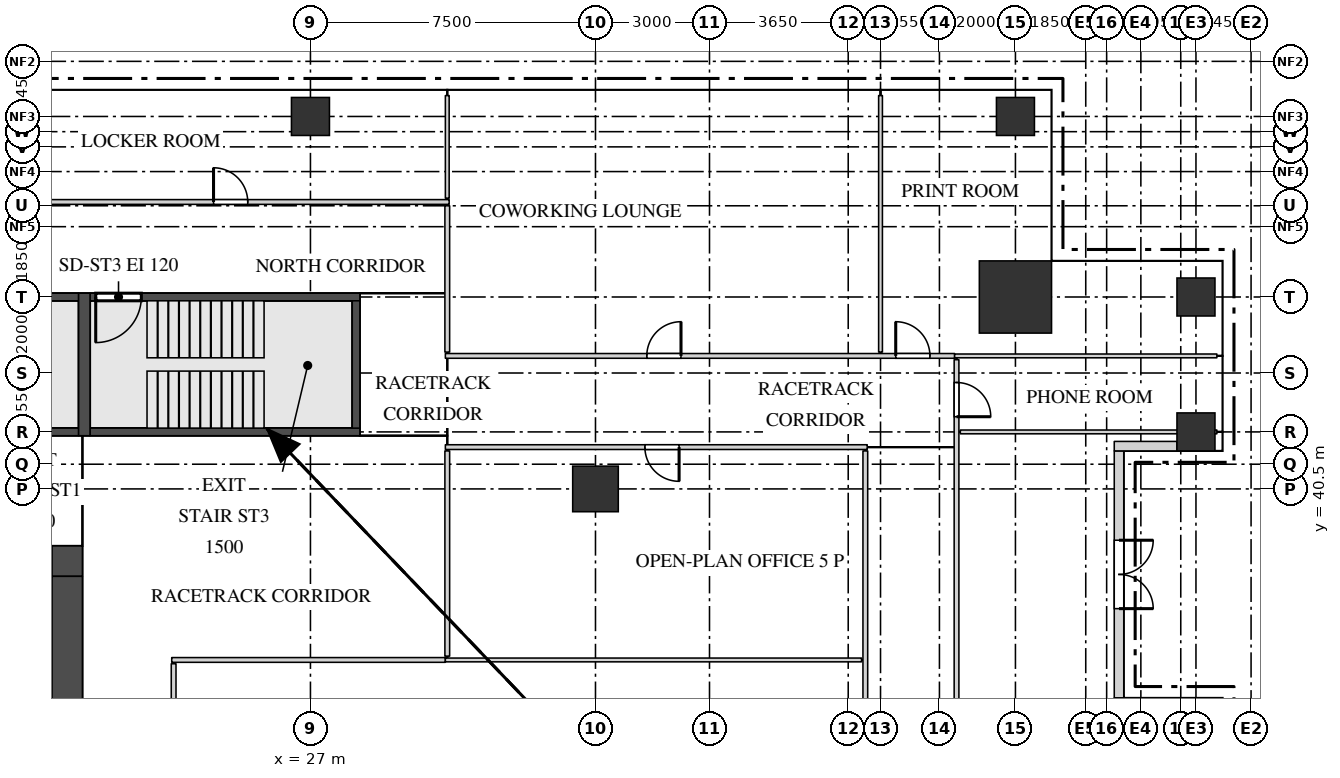
"""IFC4 building model, lengths in metres.
Left out: names, types, materials, properties, quantities, classifications, styles, units other than length and angle.
Written with IfcOpenShell. Run it as: python <this file> out.ifc"""

import sys

from ifc_helpers import new_model, si_unit, direction, frame, frame_2d, origin, origin_2d, place, context, subcontext, project, spatial, rectangle, extrude, source, transform, mapped, element, fill, save


model = new_model("IFC4")
c1 = context("Model", 3, precision=1e-05, world=origin(), true_north=direction((0.0, 1.0)))
c2 = subcontext(c1, "Body", "Model", "MODEL_VIEW")
j1 = project(units=[si_unit("LENGTHUNIT", "METRE"), si_unit("PLANEANGLEUNIT", "RADIAN")], contexts=[c1])
p1 = place(None, origin())
s1 = spatial("IfcSite", under=j1, at=p1, CompositionType="ELEMENT")
p2 = place(p1, origin())
s2 = spatial("IfcBuilding", under=s1, at=p2, CompositionType="ELEMENT")
p3 = place(p2, frame((0.0, 0.0, 188.7)))
s3 = spatial("IfcBuildingStorey", under=s2, at=p3, CompositionType="ELEMENT", Elevation=188.7)
m1 = source(origin(), c2, "Body", "SweptSolid", [
    extrude(rectangle(XDim=0.8, YDim=0.8, at=frame_2d((0.4, 0.0))), origin(), (0.0, 0.0, 1.0), 3.75),
])
p4 = place(p3, frame((20.2, 38.6, 0.0), z_axis=(0.0, 0.0, 1.0), x_axis=(1.0, 0.0, 0.0)))
e1 = element("IfcWall", 1, at=p4, inside=s3, PredefinedType="SHEAR", context=c2, shape_type="MappedRepresentation", body=[
    mapped(m1, transform((0.0, 0.0, 0.0))),
])
m2 = source(origin(), c2, "Body", "SweptSolid", [
    extrude(rectangle(XDim=22.4, YDim=0.8, at=frame_2d((11.2, 0.0))), origin(), (0.0, 0.0, 1.0), 3.75),
])
p5 = place(p3, frame((20.6, 15.8, 0.0), z_axis=(0.0, 0.0, 1.0), x_axis=(0.0, 1.0, 0.0)))
e2 = element("IfcWall", 2, at=p5, inside=s3, PredefinedType="SHEAR", context=c2, shape_type="MappedRepresentation", body=[
    mapped(m2, transform((0.0, 0.0, 0.0))),
])
m3 = source(origin(), c2, "Body", "SweptSolid", [
    extrude(rectangle(XDim=1.8, YDim=2.1, at=frame_2d((0.9, 1.05))), frame((0.0, 0.41, 0.0), z_axis=(0.0, -1.0, 0.0), x_axis=(1.0, 0.0, 0.0)), (0.0, 0.0, 1.0), 0.82),
])
p6 = place(p5, frame((10.7, 0.0, 0.0)))
e3 = element("IfcOpeningElement", 3, at=p6, cuts=e2, PredefinedType="OPENING", context=c2, shape_type="MappedRepresentation", body=[
    mapped(m3, transform((0.0, 0.0, 0.0))),
])
m4 = source(origin(), c2, "Body", "SweptSolid", [
    extrude(rectangle(XDim=0.9, YDim=2.1, at=frame_2d((0.45, 1.05))), frame((0.0, 0.41, 0.0), z_axis=(0.0, -1.0, 0.0), x_axis=(1.0, 0.0, 0.0)), (0.0, 0.0, 1.0), 0.82),
])
p7 = place(p5, frame((0.35, 0.0, 0.0)))
e4 = element("IfcOpeningElement", 4, at=p7, cuts=e2, PredefinedType="OPENING", context=c2, shape_type="MappedRepresentation", body=[
    mapped(m4, transform((0.0, 0.0, 0.0))),
])
p8 = place(p5, frame((2.15, 0.0, 0.0)))
e5 = element("IfcOpeningElement", 5, at=p8, cuts=e2, PredefinedType="OPENING", context=c2, shape_type="MappedRepresentation", body=[
    mapped(m4, transform((0.0, 0.0, 0.0))),
])
m5 = source(origin(), c2, "Body", "SweptSolid", [
    extrude(rectangle(XDim=1.0, YDim=2.1, at=frame_2d((0.5, 1.05))), frame((0.0, 0.41, 0.0), z_axis=(0.0, -1.0, 0.0), x_axis=(1.0, 0.0, 0.0)), (0.0, 0.0, 1.0), 0.82),
])
p9 = place(p5, frame((4.85, 0.0, 0.0)))
e6 = element("IfcOpeningElement", 6, at=p9, cuts=e2, PredefinedType="OPENING", context=c2, shape_type="MappedRepresentation", body=[
    mapped(m5, transform((0.0, 0.0, 0.0))),
])
m6 = source(origin(), c2, "Body", "SweptSolid", [
    extrude(rectangle(XDim=7.0, YDim=0.2, at=frame_2d((3.5, 0.0))), origin(), (0.0, 0.0, 1.0), 3.75),
])
p10 = place(p3, frame((13.9, 45.55, 0.0), z_axis=(0.0, 0.0, 1.0), x_axis=(1.0, 0.0, 0.0)))
e7 = element("IfcWall", 7, at=p10, inside=s3, PredefinedType="SHEAR", context=c2, shape_type="MappedRepresentation", body=[
    mapped(m6, transform((0.0, 0.0, 0.0))),
])
m7 = source(origin(), c2, "Body", "SweptSolid", [
    extrude(rectangle(XDim=1.2, YDim=2.1, at=frame_2d((0.6, 1.05))), frame((0.0, 0.11, 0.0), z_axis=(0.0, -1.0, 0.0), x_axis=(1.0, 0.0, 0.0)), (0.0, 0.0, 1.0), 0.22),
])
p11 = place(p10, frame((0.35, 0.0, 0.0)))
e8 = element("IfcOpeningElement", 8, at=p11, cuts=e7, PredefinedType="OPENING", context=c2, shape_type="MappedRepresentation", body=[
    mapped(m7, transform((0.0, 0.0, 0.0))),
])
p12 = place(p3, frame((13.9, 42.0, 0.0), z_axis=(0.0, 0.0, 1.0), x_axis=(1.0, 0.0, 0.0)))
e9 = element("IfcWall", 9, at=p12, inside=s3, PredefinedType="SHEAR", context=c2, shape_type="MappedRepresentation", body=[
    mapped(m6, transform((0.0, 0.0, 0.0))),
])
m8 = source(origin(), c2, "Body", "SweptSolid", [
    extrude(rectangle(XDim=7.1, YDim=0.2, at=frame_2d((3.55, 0.0))), origin(), (0.0, 0.0, 1.0), 3.75),
])
p13 = place(p3, frame((21.2, 45.55, 0.0), z_axis=(0.0, 0.0, 1.0), x_axis=(1.0, 0.0, 0.0)))
e10 = element("IfcWall", 10, at=p13, inside=s3, PredefinedType="SHEAR", context=c2, shape_type="MappedRepresentation", body=[
    mapped(m8, transform((0.0, 0.0, 0.0))),
])
p14 = place(p13, frame((0.15, 0.0, 0.0)))
e11 = element("IfcOpeningElement", 11, at=p14, cuts=e10, PredefinedType="OPENING", context=c2, shape_type="MappedRepresentation", body=[
    mapped(m7, transform((0.0, 0.0, 0.0))),
])
p15 = place(p3, frame((21.2, 42.0, 0.0), z_axis=(0.0, 0.0, 1.0), x_axis=(1.0, 0.0, 0.0)))
e12 = element("IfcWall", 12, at=p15, inside=s3, PredefinedType="SHEAR", context=c2, shape_type="MappedRepresentation", body=[
    mapped(m8, transform((0.0, 0.0, 0.0))),
])
m9 = source(origin(), c2, "Body", "SweptSolid", [
    extrude(rectangle(XDim=3.75, YDim=0.3, at=frame_2d((1.875, 0.0))), origin(), (0.0, 0.0, 1.0), 3.75),
])
p16 = place(p3, frame((21.05, 41.9, 0.0), z_axis=(0.0, 0.0, 1.0), x_axis=(0.0, 1.0, 0.0)))
e13 = element("IfcWall", 13, at=p16, inside=s3, PredefinedType="SHEAR", context=c2, shape_type="MappedRepresentation", body=[
    mapped(m9, transform((0.0, 0.0, 0.0))),
])
m10 = source(origin(), c2, "Body", "SweptSolid", [
    extrude(rectangle(XDim=3.35, YDim=0.2, at=frame_2d((1.675, 0.0))), origin(), (0.0, 0.0, 1.0), 3.75),
])
p17 = place(p3, frame((28.2, 42.1, 0.0), z_axis=(0.0, 0.0, 1.0), x_axis=(0.0, 1.0, 0.0)))
e14 = element("IfcWall", 14, at=p17, inside=s3, PredefinedType="SHEAR", context=c2, shape_type="MappedRepresentation", body=[
    mapped(m10, transform((0.0, 0.0, 0.0))),
])
m11 = source(origin(), c2, "Body", "SweptSolid", [
    extrude(rectangle(XDim=1.9, YDim=1.9, at=origin_2d()), origin(), (0.0, 0.0, 1.0), 4.0),
])
p18 = place(p3, frame((45.55, 45.55, 0.0), z_axis=(0.0, 0.0, 1.0), x_axis=(1.0, 0.0, 0.0)))
e15 = element("IfcColumn", 15, at=p18, inside=s3, PredefinedType="COLUMN", context=c2, shape_type="MappedRepresentation", body=[
    mapped(m11, transform((0.0, 0.0, 0.0))),
])
m12 = source(origin(), c2, "Body", "SweptSolid", [
    extrude(rectangle(XDim=1.0, YDim=1.0, at=origin_2d()), origin(), (0.0, 0.0, 1.0), 3.75),
])
for number, where, z_axis, x_axis in (
    (16, (50.3, 42.0, 0.0), (0.0, 0.0, 1.0), (1.0, 0.0, 0.0)),
    (17, (50.3, 45.55, 0.0), (0.0, 0.0, 1.0), (1.0, 0.0, 0.0)),
    (18, (27.0, 50.3, 0.0), (0.0, 0.0, 1.0), (1.0, 0.0, 0.0)),
    (19, (45.55, 50.3, 0.0), (0.0, 0.0, 1.0), (1.0, 0.0, 0.0)),
):
    element("IfcColumn", number, at=place(p3, frame(where, z_axis=z_axis, x_axis=x_axis)), inside=s3, PredefinedType="COLUMN", context=c2, shape_type="MappedRepresentation", body=[
        mapped(m12, transform((0.0, 0.0, 0.0))),
    ])
m13 = source(origin(), c2, "Body", "SweptSolid", [
    extrude(rectangle(XDim=1.2, YDim=1.2, at=origin_2d()), origin(), (0.0, 0.0, 1.0), 3.75),
])
p19 = place(p3, frame((34.5, 40.5, 0.0), z_axis=(0.0, 0.0, 1.0), x_axis=(1.0, 0.0, 0.0)))
e20 = element("IfcColumn", 20, at=p19, inside=s3, PredefinedType="COLUMN", context=c2, shape_type="MappedRepresentation", body=[
    mapped(m13, transform((0.0, 0.0, 0.0))),
])
m14 = source(origin(), c2, "Body", "SweptSolid", [
    extrude(rectangle(XDim=6.5, YDim=0.25, at=frame_2d((3.25, 0.0))), origin(), (0.0, 0.0, 1.0), 3.15),
])
p20 = place(p3, frame((48.275, 35.0, 0.0), z_axis=(0.0, 0.0, 1.0), x_axis=(0.0, 1.0, 0.0)))
e21 = element("IfcWall", 21, at=p20, inside=s3, PredefinedType="SOLIDWALL", context=c2, shape_type="MappedRepresentation", body=[
    mapped(m14, transform((0.0, 0.0, 0.0))),
])
m15 = source(origin(), c2, "Body", "SweptSolid", [
    extrude(rectangle(XDim=1.75, YDim=2.4, at=frame_2d((0.875, 1.2))), frame((0.0, 0.135, 0.0), z_axis=(0.0, -1.0, 0.0), x_axis=(1.0, 0.0, 0.0)), (0.0, 0.0, 1.0), 0.27),
])
p21 = place(p20, frame((0.3, 0.0, 0.0)))
e22 = element("IfcOpeningElement", 22, at=p21, cuts=e21, PredefinedType="OPENING", context=c2, shape_type="MappedRepresentation", body=[
    mapped(m15, transform((0.0, 0.0, 0.0))),
])
p22 = place(p20, frame((4.45, 0.0, 0.0)))
e23 = element("IfcOpeningElement", 23, at=p22, cuts=e21, PredefinedType="OPENING", context=c2, shape_type="MappedRepresentation", body=[
    mapped(m15, transform((0.0, 0.0, 0.0))),
])
m16 = source(origin(), c2, "Body", "SweptSolid", [
    extrude(rectangle(XDim=1.8, YDim=2.4, at=frame_2d((0.9, 1.2))), frame((0.0, 0.135, 0.0), z_axis=(0.0, -1.0, 0.0), x_axis=(1.0, 0.0, 0.0)), (0.0, 0.0, 1.0), 0.27),
])
p23 = place(p20, frame((2.35, 0.0, 0.0)))
e24 = element("IfcOpeningElement", 24, at=p23, cuts=e21, PredefinedType="OPENING", context=c2, shape_type="MappedRepresentation", body=[
    mapped(m16, transform((0.0, 0.0, 0.0))),
])
m17 = source(origin(), c2, "Body", "SweptSolid", [
    extrude(rectangle(XDim=1.65, YDim=0.25, at=frame_2d((0.825, 0.0))), origin(), (0.0, 0.0, 1.0), 3.15),
])
p24 = place(p3, frame((49.8, 41.625, 0.0), z_axis=(0.0, 0.0, 1.0), x_axis=(-1.0, 0.0, 0.0)))
e25 = element("IfcWall", 25, at=p24, inside=s3, PredefinedType="SOLIDWALL", context=c2, shape_type="MappedRepresentation", body=[
    mapped(m17, transform((0.0, 0.0, 0.0))),
])
m18 = source(origin(), c2, "Body", "SweptSolid", [
    extrude(rectangle(XDim=33.8, YDim=0.125, at=frame_2d((16.9, 0.0))), origin(), (0.0, 0.0, 1.0), 3.8),
])
p25 = place(p3, frame((44.0, 10.1, 0.0), z_axis=(0.0, 0.0, 1.0), x_axis=(0.0, 1.0, 0.0)))
e26 = element("IfcWall", 26, at=p25, inside=s3, PredefinedType="PARTITIONING", context=c2, shape_type="MappedRepresentation", body=[
    mapped(m18, transform((0.0, 0.0, 0.0))),
])
m19 = source(origin(), c2, "Body", "SweptSolid", [
    extrude(rectangle(XDim=0.9, YDim=2.1, at=frame_2d((0.45, 1.05))), frame((0.0, 0.073, 0.0), z_axis=(0.0, -1.0, 0.0), x_axis=(1.0, 0.0, 0.0)), (0.0, 0.0, 1.0), 0.145),
])
p26 = place(p25, frame((5.25, 0.0, 0.0)))
e27 = element("IfcOpeningElement", 27, at=p26, cuts=e26, PredefinedType="OPENING", context=c2, shape_type="MappedRepresentation", body=[
    mapped(m19, transform((0.0, 0.0, 0.0))),
])
p27 = place(p25, frame((12.55, 0.0, 0.0)))
e28 = element("IfcOpeningElement", 28, at=p27, cuts=e26, PredefinedType="OPENING", context=c2, shape_type="MappedRepresentation", body=[
    mapped(m19, transform((0.0, 0.0, 0.0))),
])
p28 = place(p25, frame((23.6, 0.0, 0.0)))
e29 = element("IfcOpeningElement", 29, at=p28, cuts=e26, PredefinedType="OPENING", context=c2, shape_type="MappedRepresentation", body=[
    mapped(m19, transform((0.0, 0.0, 0.0))),
])
p29 = place(p25, frame((32.3, 0.0, 0.0)))
e30 = element("IfcOpeningElement", 30, at=p29, cuts=e26, PredefinedType="OPENING", context=c2, shape_type="MappedRepresentation", body=[
    mapped(m19, transform((0.0, 0.0, 0.0))),
])
m20 = source(origin(), c2, "Body", "SweptSolid", [
    extrude(rectangle(XDim=23.4, YDim=0.125, at=frame_2d((11.7, 0.0))), origin(), (0.0, 0.0, 1.0), 3.8),
])
p30 = place(p3, frame((23.4, 12.5, 0.0), z_axis=(0.0, 0.0, 1.0), x_axis=(0.0, 1.0, 0.0)))
e31 = element("IfcWall", 31, at=p30, inside=s3, PredefinedType="PARTITIONING", context=c2, shape_type="MappedRepresentation", body=[
    mapped(m20, transform((0.0, 0.0, 0.0))),
])
m21 = source(origin(), c2, "Body", "SweptSolid", [
    extrude(rectangle(XDim=1.2, YDim=2.1, at=frame_2d((0.6, 1.05))), frame((0.0, 0.073, 0.0), z_axis=(0.0, -1.0, 0.0), x_axis=(1.0, 0.0, 0.0)), (0.0, 0.0, 1.0), 0.145),
])
p31 = place(p30, frame((6.6, 0.0, 0.0)))
e32 = element("IfcOpeningElement", 32, at=p31, cuts=e31, PredefinedType="OPENING", context=c2, shape_type="MappedRepresentation", body=[
    mapped(m21, transform((0.0, 0.0, 0.0))),
])
m22 = source(origin(), c2, "Body", "SweptSolid", [
    extrude(rectangle(XDim=29.0, YDim=0.125, at=frame_2d((14.5, 0.0))), origin(), (0.0, 0.0, 1.0), 3.8),
])
p32 = place(p3, frame((41.6, 12.5, 0.0), z_axis=(0.0, 0.0, 1.0), x_axis=(0.0, 1.0, 0.0)))
e33 = element("IfcWall", 33, at=p32, inside=s3, PredefinedType="PARTITIONING", context=c2, shape_type="MappedRepresentation", body=[
    mapped(m22, transform((0.0, 0.0, 0.0))),
])
p33 = place(p32, frame((18.4, 0.0, 0.0)))
e34 = element("IfcOpeningElement", 34, at=p33, cuts=e33, PredefinedType="OPENING", context=c2, shape_type="MappedRepresentation", body=[
    mapped(m21, transform((0.0, 0.0, 0.0))),
])
m23 = source(origin(), c2, "Body", "SweptSolid", [
    extrude(rectangle(XDim=7.2, YDim=0.125, at=frame_2d((3.6, 0.0))), origin(), (0.0, 0.0, 1.0), 3.8),
])
p34 = place(p3, frame((23.35, 36.0, 0.0), z_axis=(0.0, 0.0, 1.0), x_axis=(1.0, 0.0, 0.0)))
e35 = element("IfcWall", 35, at=p34, inside=s3, PredefinedType="PARTITIONING", context=c2, shape_type="MappedRepresentation", body=[
    mapped(m23, transform((0.0, 0.0, 0.0))),
])
m24 = source(origin(), c2, "Body", "SweptSolid", [
    extrude(rectangle(XDim=10.95, YDim=0.1, at=frame_2d((5.475, 0.0))), origin(), (0.0, 0.0, 1.0), 3.8),
])
p35 = place(p3, frame((30.55, 36.0, 0.0), z_axis=(0.0, 0.0, 1.0), x_axis=(1.0, 0.0, 0.0)))
e36 = element("IfcWall", 36, at=p35, inside=s3, PredefinedType="PARTITIONING", context=c2, shape_type="MappedRepresentation", body=[
    mapped(m24, transform((0.0, 0.0, 0.0))),
])
m25 = source(origin(), c2, "Body", "SweptSolid", [
    extrude(rectangle(XDim=5.4, YDim=0.125, at=frame_2d((2.7, 0.0))), origin(), (0.0, 0.0, 1.0), 3.8),
])
p36 = place(p3, frame((30.6, 36.1, 0.0), z_axis=(0.0, 0.0, 1.0), x_axis=(0.0, 1.0, 0.0)))
e37 = element("IfcWall", 37, at=p36, inside=s3, PredefinedType="PARTITIONING", context=c2, shape_type="MappedRepresentation", body=[
    mapped(m25, transform((0.0, 0.0, 0.0))),
])
m26 = source(origin(), c2, "Body", "SweptSolid", [
    extrude(rectangle(XDim=11.1, YDim=0.125, at=frame_2d((5.55, 0.0))), origin(), (0.0, 0.0, 1.0), 3.8),
])
p37 = place(p3, frame((30.55, 41.6, 0.0), z_axis=(0.0, 0.0, 1.0), x_axis=(1.0, 0.0, 0.0)))
e38 = element("IfcWall", 38, at=p37, inside=s3, PredefinedType="PARTITIONING", context=c2, shape_type="MappedRepresentation", body=[
    mapped(m26, transform((0.0, 0.0, 0.0))),
])
p38 = place(p37, frame((5.25, 0.0, 0.0)))
e39 = element("IfcOpeningElement", 39, at=p38, cuts=e38, PredefinedType="OPENING", context=c2, shape_type="MappedRepresentation", body=[
    mapped(m19, transform((0.0, 0.0, 0.0))),
])
m27 = source(origin(), c2, "Body", "SweptSolid", [
    extrude(rectangle(XDim=6.75, YDim=0.1, at=frame_2d((3.375, 0.0))), origin(), (0.0, 0.0, 1.0), 3.8),
])
p39 = place(p3, frame((44.1, 42.0, 0.0), z_axis=(0.0, 0.0, 1.0), x_axis=(1.0, 0.0, 0.0)))
e40 = element("IfcWall", 40, at=p39, inside=s3, PredefinedType="PARTITIONING", context=c2, shape_type="MappedRepresentation", body=[
    mapped(m27, transform((0.0, 0.0, 0.0))),
])
m28 = source(origin(), c2, "Body", "SweptSolid", [
    extrude(rectangle(XDim=13.4, YDim=0.125, at=frame_2d((6.7, 0.0))), origin(), (0.0, 0.0, 1.0), 3.8),
])
p40 = place(p3, frame((30.55, 44.0, 0.0), z_axis=(0.0, 0.0, 1.0), x_axis=(1.0, 0.0, 0.0)))
e41 = element("IfcWall", 41, at=p40, inside=s3, PredefinedType="PARTITIONING", context=c2, shape_type="MappedRepresentation", body=[
    mapped(m28, transform((0.0, 0.0, 0.0))),
])
p41 = place(p40, frame((5.3, 0.0, 0.0)))
e42 = element("IfcOpeningElement", 42, at=p41, cuts=e41, PredefinedType="OPENING", context=c2, shape_type="MappedRepresentation", body=[
    mapped(m19, transform((0.0, 0.0, 0.0))),
])
p42 = place(p40, frame((11.85, 0.0, 0.0)))
e43 = element("IfcOpeningElement", 43, at=p42, cuts=e41, PredefinedType="OPENING", context=c2, shape_type="MappedRepresentation", body=[
    mapped(m19, transform((0.0, 0.0, 0.0))),
])
m29 = source(origin(), c2, "Body", "SweptSolid", [
    extrude(rectangle(XDim=6.9, YDim=0.1, at=frame_2d((3.45, 0.0))), origin(), (0.0, 0.0, 1.0), 3.8),
])
p43 = place(p3, frame((43.95, 44.0, 0.0), z_axis=(0.0, 0.0, 1.0), x_axis=(1.0, 0.0, 0.0)))
e44 = element("IfcWall", 44, at=p43, inside=s3, PredefinedType="PARTITIONING", context=c2, shape_type="MappedRepresentation", body=[
    mapped(m29, transform((0.0, 0.0, 0.0))),
])
m30 = source(origin(), c2, "Body", "SweptSolid", [
    extrude(rectangle(XDim=3.85, YDim=0.125, at=frame_2d((1.925, 0.0))), origin(), (0.0, 0.0, 1.0), 3.8),
])
p44 = place(p3, frame((30.6, 44.1, 0.0), z_axis=(0.0, 0.0, 1.0), x_axis=(0.0, 1.0, 0.0)))
e45 = element("IfcWall", 45, at=p44, inside=s3, PredefinedType="PARTITIONING", context=c2, shape_type="MappedRepresentation", body=[
    mapped(m30, transform((0.0, 0.0, 0.0))),
])
m31 = source(origin(), c2, "Body", "SweptSolid", [
    extrude(rectangle(XDim=6.75, YDim=0.1, at=frame_2d((3.375, 0.0))), origin(), (0.0, 0.0, 1.0), 3.3),
])
p45 = place(p3, frame((42.0, 44.1, 0.0), z_axis=(0.0, 0.0, 1.0), x_axis=(0.0, 1.0, 0.0)))
e46 = element("IfcWall", 46, at=p45, inside=s3, PredefinedType="PARTITIONING", context=c2, shape_type="MappedRepresentation", body=[
    mapped(m31, transform((0.0, 0.0, 0.0))),
])
m32 = source(origin(), c2, "Body", "SweptSolid", [
    extrude(rectangle(XDim=2.7, YDim=0.1, at=frame_2d((1.35, 0.0))), origin(), (0.0, 0.0, 1.0), 3.8),
])
p46 = place(p3, frame((30.6, 48.15, 0.0), z_axis=(0.0, 0.0, 1.0), x_axis=(0.0, 1.0, 0.0)))
e47 = element("IfcWall", 47, at=p46, inside=s3, PredefinedType="PARTITIONING", context=c2, shape_type="MappedRepresentation", body=[
    mapped(m32, transform((0.0, 0.0, 0.0))),
])
m33 = source(origin(), c2, "Body", "SweptSolid", [
    extrude(rectangle(XDim=13.9, YDim=0.125, at=frame_2d((6.95, 0.0))), origin(), (0.0, 0.0, 1.0), 3.8),
])
p47 = place(p3, frame((16.75, 48.05, 0.0), z_axis=(0.0, 0.0, 1.0), x_axis=(1.0, 0.0, 0.0)))
e48 = element("IfcWall", 48, at=p47, inside=s3, PredefinedType="PARTITIONING", context=c2, shape_type="MappedRepresentation", body=[
    mapped(m33, transform((0.0, 0.0, 0.0))),
])
p48 = place(p47, frame((7.7, 0.0, 0.0)))
e49 = element("IfcOpeningElement", 49, at=p48, cuts=e48, PredefinedType="OPENING", context=c2, shape_type="MappedRepresentation", body=[
    mapped(m19, transform((0.0, 0.0, 0.0))),
])
m34 = source(origin(), c2, "Body", "SweptSolid", [
    extrude(rectangle(XDim=1.75, YDim=2.4, at=frame_2d((0.875, 1.2))), frame((0.0, 0.03, 0.0), z_axis=(0.0, -1.0, 0.0), x_axis=(1.0, 0.0, 0.0)), (0.0, 0.0, 1.0), 0.06),
])
p49 = place(p21, origin())
e50 = element("IfcWindow", 50, at=p49, inside=s3, PartitioningType="SINGLE_PANEL", PredefinedType="WINDOW", context=c2, shape_type="MappedRepresentation", body=[
    mapped(m34, transform((0.0, 0.0, 0.0))),
])
fill(e22, e50)
p50 = place(p22, origin())
e51 = element("IfcWindow", 51, at=p50, inside=s3, PartitioningType="SINGLE_PANEL", PredefinedType="WINDOW", context=c2, shape_type="MappedRepresentation", body=[
    mapped(m34, transform((0.0, 0.0, 0.0))),
])
fill(e23, e51)
m35 = source(origin(), c2, "Body", "SweptSolid", [
    extrude(rectangle(XDim=1.8, YDim=2.4, at=frame_2d((0.9, 1.2))), frame((0.0, 0.025, 0.0), z_axis=(0.0, -1.0, 0.0), x_axis=(1.0, 0.0, 0.0)), (0.0, 0.0, 1.0), 0.05),
])
p51 = place(p23, origin())
e52 = element("IfcDoor", 52, at=p51, inside=s3, OperationType="DOUBLE_DOOR_DOUBLE_SWING", PredefinedType="DOOR", context=c2, shape_type="MappedRepresentation", body=[
    mapped(m35, transform((0.0, 0.0, 0.0))),
])
fill(e24, e52)
m36 = source(origin(), c2, "Body", "SweptSolid", [
    extrude(rectangle(XDim=0.9, YDim=2.1, at=frame_2d((0.45, 1.05))), frame((0.0, 0.025, 0.0), z_axis=(0.0, -1.0, 0.0), x_axis=(1.0, 0.0, 0.0)), (0.0, 0.0, 1.0), 0.05),
])
p52 = place(p29, origin())
e53 = element("IfcDoor", 53, at=p52, inside=s3, OperationType="SINGLE_SWING_LEFT", PredefinedType="DOOR", context=c2, shape_type="MappedRepresentation", body=[
    mapped(m36, transform((0.0, 0.0, 0.0))),
])
fill(e30, e53)
p53 = place(p41, origin())
e54 = element("IfcDoor", 54, at=p53, inside=s3, OperationType="SINGLE_SWING_LEFT", PredefinedType="DOOR", context=c2, shape_type="MappedRepresentation", body=[
    mapped(m36, transform((0.0, 0.0, 0.0))),
])
fill(e42, e54)
p54 = place(p42, origin())
e55 = element("IfcDoor", 55, at=p54, inside=s3, OperationType="SINGLE_SWING_RIGHT", PredefinedType="DOOR", context=c2, shape_type="MappedRepresentation", body=[
    mapped(m36, transform((0.0, 0.0, 0.0))),
])
fill(e43, e55)
p55 = place(p38, origin())
e56 = element("IfcDoor", 56, at=p55, inside=s3, OperationType="SINGLE_SWING_RIGHT", PredefinedType="DOOR", context=c2, shape_type="MappedRepresentation", body=[
    mapped(m36, transform((0.0, 0.0, 0.0))),
])
fill(e39, e56)
p56 = place(p48, origin())
e57 = element("IfcDoor", 57, at=p56, inside=s3, OperationType="SINGLE_SWING_RIGHT", PredefinedType="DOOR", context=c2, shape_type="MappedRepresentation", body=[
    mapped(m36, transform((0.0, 0.0, 0.0))),
])
fill(e49, e57)
m37 = source(origin(), c2, "Body", "SweptSolid", [
    extrude(rectangle(XDim=1.2, YDim=2.1, at=frame_2d((0.6, 1.05))), frame((0.0, 0.025, 0.0), z_axis=(0.0, -1.0, 0.0), x_axis=(1.0, 0.0, 0.0)), (0.0, 0.0, 1.0), 0.05),
])
p57 = place(p14, origin())
e58 = element("IfcDoor", 58, at=p57, inside=s3, OperationType="SINGLE_SWING_LEFT", PredefinedType="DOOR", context=c2, shape_type="MappedRepresentation", body=[
    mapped(m37, transform((0.0, 0.0, 0.0))),
])
fill(e11, e58)
save(model, sys.argv[1])
